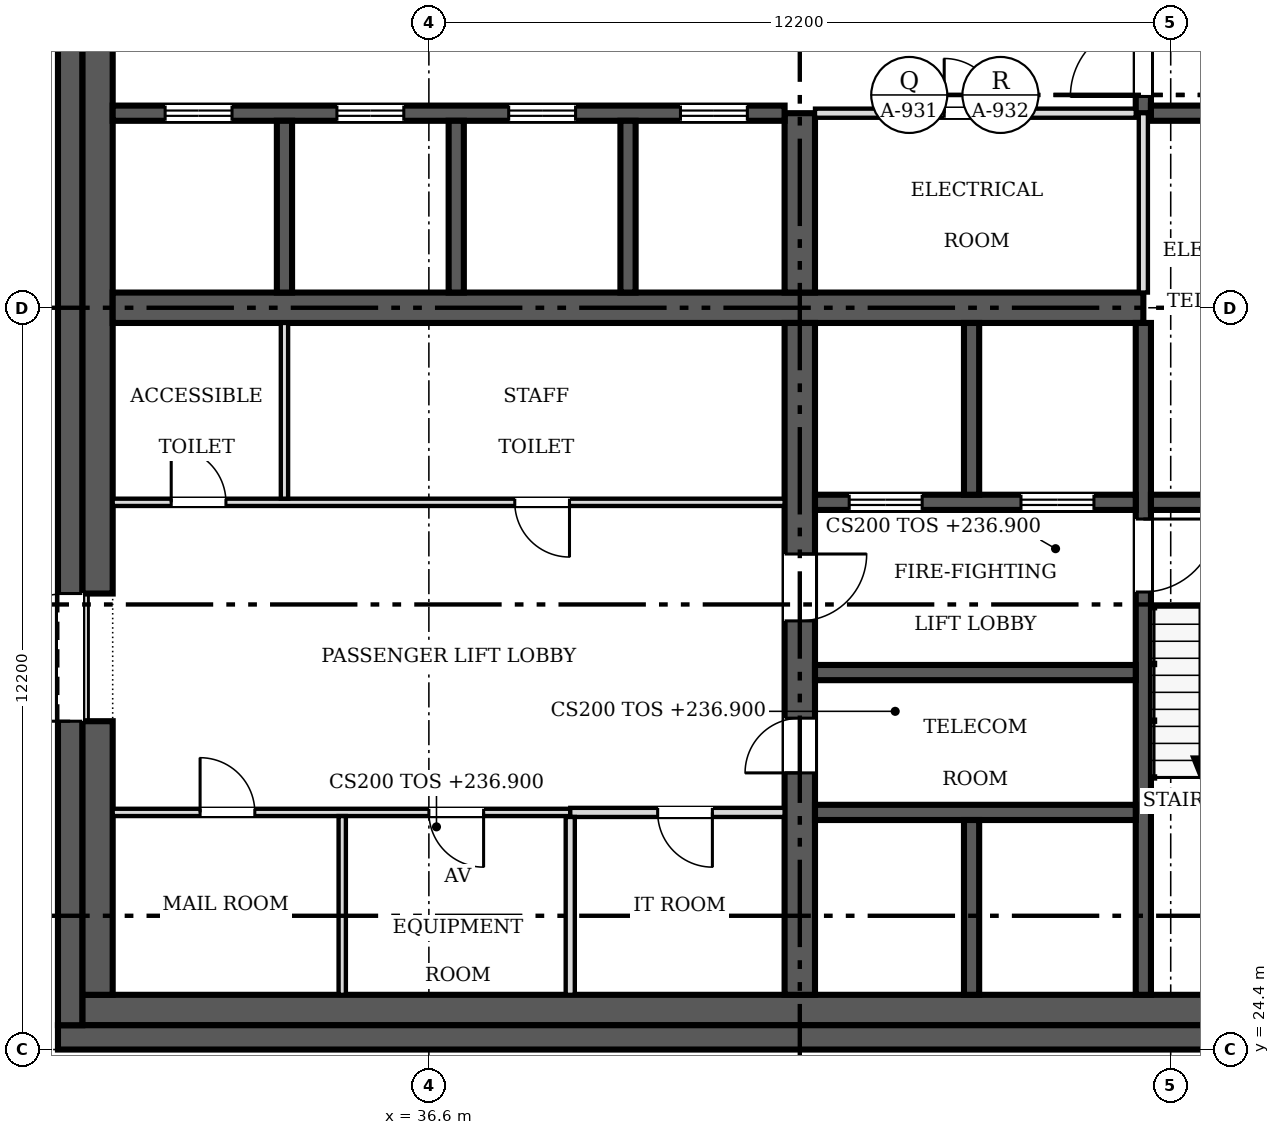
"""IFC4 building model, lengths in metres.
Left out: names, types, materials, properties, quantities, classifications, styles, units other than length and angle.
Written with IfcOpenShell. Run it as: python <this file> out.ifc"""

import sys

from ifc_helpers import new_model, si_unit, direction, frame, frame_2d, origin, place, context, subcontext, project, spatial, rectangle, extrude, source, transform, mapped, element, fill, save


model = new_model("IFC4")
c1 = context("Model", 3, precision=1e-05, world=origin(), true_north=direction((0.0, 1.0)))
c2 = subcontext(c1, "Body", "Model", "MODEL_VIEW")
j1 = project(units=[si_unit("LENGTHUNIT", "METRE"), si_unit("PLANEANGLEUNIT", "RADIAN")], contexts=[c1])
p1 = place(None, origin())
s1 = spatial("IfcSite", under=j1, at=p1, CompositionType="ELEMENT")
p2 = place(p1, origin())
s2 = spatial("IfcBuilding", under=s1, at=p2, CompositionType="ELEMENT")
p3 = place(p2, frame((0.0, 0.0, 236.9)))
s3 = spatial("IfcBuildingStorey", under=s2, at=p3, CompositionType="ELEMENT", Elevation=236.9)
p4 = place(p3, frame((54.9, 24.6, 0.0), z_axis=(0.0, 0.0, 1.0), x_axis=(-1.0, 0.0, 0.0)))
e1 = element("IfcWall", 1, at=p4, inside=s3, PredefinedType="SHEAR", context=c2, shape_type="SweptSolid", body=[
    extrude(rectangle(XDim=24.4, YDim=0.4, at=frame_2d((12.2, 0.0))), origin(), (0.0, 0.0, 1.0), 3.8),
])
m1 = source(origin(), c2, "Body", "SweptSolid", [
    extrude(rectangle(XDim=1.2, YDim=2.1, at=frame_2d((0.6, 1.05))), frame((0.0, 0.21, 0.0), z_axis=(0.0, -1.0, 0.0), x_axis=(1.0, 0.0, 0.0)), (0.0, 0.0, 1.0), 0.42),
])
p5 = place(p4, frame((1.5, 0.0, 0.0)))
e2 = element("IfcOpeningElement", 2, at=p5, cuts=e1, PredefinedType="OPENING", context=c2, shape_type="MappedRepresentation", body=[
    mapped(m1, transform((0.0, 0.0, 0.0), scale=1.0)),
])
p6 = place(p3, frame((30.7, 24.8, 0.0), z_axis=(0.0, 0.0, 1.0), x_axis=(0.0, 1.0, 0.0)))
e3 = element("IfcWall", 3, at=p6, inside=s3, PredefinedType="SHEAR", context=c2, shape_type="SweptSolid", body=[
    extrude(rectangle(XDim=23.6, YDim=0.4, at=frame_2d((11.8, 0.0))), origin(), (0.0, 0.0, 1.0), 3.8),
])
m2 = source(origin(), c2, "Body", "SweptSolid", [
    extrude(rectangle(XDim=2.1, YDim=2.4, at=frame_2d((1.05, 1.2))), frame((0.0, 0.21, 0.0), z_axis=(0.0, -1.0, 0.0), x_axis=(1.0, 0.0, 0.0)), (0.0, 0.0, 1.0), 0.42),
])
p7 = place(p6, frame((5.0, 0.0, 0.0)))
e4 = element("IfcOpeningElement", 4, at=p7, cuts=e3, PredefinedType="OPENING", context=c2, shape_type="MappedRepresentation", body=[
    mapped(m2, transform((0.0, 0.0, 0.0), scale=1.0)),
])
p8 = place(p6, frame((16.5, 0.0, 0.0)))
e5 = element("IfcOpeningElement", 5, at=p8, cuts=e3, PredefinedType="OPENING", context=c2, shape_type="MappedRepresentation", body=[
    mapped(m2, transform((0.0, 0.0, 0.0), scale=1.0)),
])
p9 = place(p3, frame((30.9, 25.05, 0.0), z_axis=(0.0, 0.0, 1.0), x_axis=(1.0, 0.0, 0.0)))
e6 = element("IfcWall", 6, at=p9, inside=s3, PredefinedType="SOLIDWALL", context=c2, shape_type="SweptSolid", body=[
    extrude(rectangle(XDim=21.3, YDim=0.5, at=frame_2d((10.65, 0.0))), origin(), (0.0, 0.0, 1.0), 3.8),
])
p10 = place(p3, frame((31.15, 25.3, 0.0), z_axis=(0.0, 0.0, 1.0), x_axis=(0.0, 1.0, 0.0)))
e7 = element("IfcWall", 7, at=p10, inside=s3, PredefinedType="SOLIDWALL", context=c2, shape_type="SweptSolid", body=[
    extrude(rectangle(XDim=4.5, YDim=0.5, at=frame_2d((2.25, 0.0))), origin(), (0.0, 0.0, 1.0), 3.8),
])
p11 = place(p3, frame((31.15, 31.9, 0.0), z_axis=(0.0, 0.0, 1.0), x_axis=(0.0, 1.0, 0.0)))
e8 = element("IfcWall", 8, at=p11, inside=s3, PredefinedType="SOLIDWALL", context=c2, shape_type="SweptSolid", body=[
    extrude(rectangle(XDim=9.4, YDim=0.5, at=frame_2d((4.7, 0.0))), origin(), (0.0, 0.0, 1.0), 3.8),
])
p12 = place(p3, frame((31.4, 36.6, 0.0), z_axis=(0.0, 0.0, 1.0), x_axis=(1.0, 0.0, 0.0)))
e9 = element("IfcWall", 9, at=p12, inside=s3, PredefinedType="SHEAR", context=c2, shape_type="SweptSolid", body=[
    extrude(rectangle(XDim=16.95, YDim=0.5, at=frame_2d((8.475, 0.0))), origin(), (0.0, 0.0, 1.0), 3.8),
])
p13 = place(p3, frame((42.7, 36.35, 0.0), z_axis=(0.0, 0.0, 1.0), x_axis=(0.0, -1.0, 0.0)))
e10 = element("IfcWall", 10, at=p13, inside=s3, PredefinedType="SHEAR", context=c2, shape_type="SweptSolid", body=[
    extrude(rectangle(XDim=11.05, YDim=0.5, at=frame_2d((5.525, 0.0))), origin(), (0.0, 0.0, 1.0), 3.8),
])
m3 = source(origin(), c2, "Body", "SweptSolid", [
    extrude(rectangle(XDim=0.9, YDim=2.1, at=frame_2d((0.45, 1.05))), frame((0.0, 0.26, 0.0), z_axis=(0.0, -1.0, 0.0), x_axis=(1.0, 0.0, 0.0)), (0.0, 0.0, 1.0), 0.52),
])
p14 = place(p13, frame((6.5, 0.0, 0.0)))
e11 = element("IfcOpeningElement", 11, at=p14, cuts=e10, PredefinedType="OPENING", context=c2, shape_type="MappedRepresentation", body=[
    mapped(m3, transform((0.0, 0.0, 0.0), scale=1.0)),
])
m4 = source(origin(), c2, "Body", "SweptSolid", [
    extrude(rectangle(XDim=1.1, YDim=2.1, at=frame_2d((0.55, 1.05))), frame((0.0, 0.26, 0.0), z_axis=(0.0, -1.0, 0.0), x_axis=(1.0, 0.0, 0.0)), (0.0, 0.0, 1.0), 0.52),
])
p15 = place(p13, frame((3.8, 0.0, 0.0)))
e12 = element("IfcOpeningElement", 12, at=p15, cuts=e10, PredefinedType="OPENING", context=c2, shape_type="MappedRepresentation", body=[
    mapped(m4, transform((0.0, 0.0, 0.0), scale=1.0)),
])
p16 = place(p3, frame((42.7, 36.85, 0.0), z_axis=(0.0, 0.0, 1.0), x_axis=(0.0, 1.0, 0.0)))
e13 = element("IfcWall", 13, at=p16, inside=s3, PredefinedType="SHEAR", context=c2, shape_type="SweptSolid", body=[
    extrude(rectangle(XDim=2.95, YDim=0.5, at=frame_2d((1.475, 0.0))), origin(), (0.0, 0.0, 1.0), 3.8),
])
p17 = place(p3, frame((31.4, 39.8, 0.0), z_axis=(0.0, 0.0, 1.0), x_axis=(1.0, 0.0, 0.0)))
e14 = element("IfcWall", 14, at=p17, inside=s3, PredefinedType="SOLIDWALL", context=c2, shape_type="SweptSolid", body=[
    extrude(rectangle(XDim=11.05, YDim=0.25, at=frame_2d((5.525, 0.0))), origin(), (0.0, 0.0, 1.0), 3.8),
])
m5 = source(origin(), c2, "Body", "SweptSolid", [
    extrude(rectangle(XDim=1.1, YDim=2.1, at=frame_2d((0.55, 1.05))), frame((0.0, 0.135, 0.0), z_axis=(0.0, -1.0, 0.0), x_axis=(1.0, 0.0, 0.0)), (0.0, 0.0, 1.0), 0.27),
])
p18 = place(p17, frame((0.863, 0.0, 0.0)))
e15 = element("IfcOpeningElement", 15, at=p18, cuts=e14, PredefinedType="OPENING", context=c2, shape_type="MappedRepresentation", body=[
    mapped(m5, transform((0.0, 0.0, 0.0), scale=1.0)),
])
p19 = place(p17, frame((3.688, 0.0, 0.0)))
e16 = element("IfcOpeningElement", 16, at=p19, cuts=e14, PredefinedType="OPENING", context=c2, shape_type="MappedRepresentation", body=[
    mapped(m5, transform((0.0, 0.0, 0.0), scale=1.0)),
])
p20 = place(p17, frame((6.512, 0.0, 0.0)))
e17 = element("IfcOpeningElement", 17, at=p20, cuts=e14, PredefinedType="OPENING", context=c2, shape_type="MappedRepresentation", body=[
    mapped(m5, transform((0.0, 0.0, 0.0), scale=1.0)),
])
p21 = place(p17, frame((9.337, 0.0, 0.0)))
e18 = element("IfcOpeningElement", 18, at=p21, cuts=e14, PredefinedType="OPENING", context=c2, shape_type="MappedRepresentation", body=[
    mapped(m5, transform((0.0, 0.0, 0.0), scale=1.0)),
])
p22 = place(p3, frame((48.35, 36.35, 0.0), z_axis=(0.0, 0.0, 1.0), x_axis=(0.0, -1.0, 0.0)))
e19 = element("IfcWall", 19, at=p22, inside=s3, PredefinedType="SOLIDWALL", context=c2, shape_type="SweptSolid", body=[
    extrude(rectangle(XDim=11.05, YDim=0.25, at=frame_2d((5.525, 0.0))), origin(), (0.0, 0.0, 1.0), 3.8),
])
m6 = source(origin(), c2, "Body", "SweptSolid", [
    extrude(rectangle(XDim=1.2, YDim=2.1, at=frame_2d((0.6, 1.05))), frame((0.0, 0.135, 0.0), z_axis=(0.0, -1.0, 0.0), x_axis=(1.0, 0.0, 0.0)), (0.0, 0.0, 1.0), 0.27),
])
p23 = place(p22, frame((3.225, 0.0, 0.0)))
e20 = element("IfcOpeningElement", 20, at=p23, cuts=e19, PredefinedType="OPENING", context=c2, shape_type="MappedRepresentation", body=[
    mapped(m6, transform((0.0, 0.0, 0.0), scale=1.0)),
])
p24 = place(p3, frame((48.225, 33.4, 0.0), z_axis=(0.0, 0.0, 1.0), x_axis=(-1.0, 0.0, 0.0)))
e21 = element("IfcWall", 21, at=p24, inside=s3, PredefinedType="SOLIDWALL", context=c2, shape_type="SweptSolid", body=[
    extrude(rectangle(XDim=5.275, YDim=0.25, at=frame_2d((2.638, 0.0))), origin(), (0.0, 0.0, 1.0), 3.8),
])
p25 = place(p24, frame((3.512, 0.0, 0.0)))
e22 = element("IfcOpeningElement", 22, at=p25, cuts=e21, PredefinedType="OPENING", context=c2, shape_type="MappedRepresentation", body=[
    mapped(m6, transform((0.0, 0.0, 0.0), scale=1.0)),
])
p26 = place(p24, frame((0.688, 0.0, 0.0)))
e23 = element("IfcOpeningElement", 23, at=p26, cuts=e21, PredefinedType="OPENING", context=c2, shape_type="MappedRepresentation", body=[
    mapped(m6, transform((0.0, 0.0, 0.0), scale=1.0)),
])
p27 = place(p3, frame((48.475, 33.4, 0.0), z_axis=(0.0, 0.0, 1.0), x_axis=(1.0, 0.0, 0.0)))
e24 = element("IfcWall", 24, at=p27, inside=s3, PredefinedType="SOLIDWALL", context=c2, shape_type="SweptSolid", body=[
    extrude(rectangle(XDim=3.525, YDim=0.25, at=frame_2d((1.762, 0.0))), origin(), (0.0, 0.0, 1.0), 3.8),
])
p28 = place(p3, frame((48.35, 47.9, 0.0), z_axis=(0.0, 0.0, 1.0), x_axis=(0.0, -1.0, 0.0)))
e25 = element("IfcWall", 25, at=p28, inside=s3, PredefinedType="SOLIDWALL", context=c2, shape_type="SweptSolid", body=[
    extrude(rectangle(XDim=8.1, YDim=0.25, at=frame_2d((4.05, 0.0))), origin(), (0.0, 0.0, 1.0), 3.8),
])
p29 = place(p28, frame((6.625, 0.0, 0.0)))
e26 = element("IfcOpeningElement", 26, at=p29, cuts=e25, PredefinedType="OPENING", context=c2, shape_type="MappedRepresentation", body=[
    mapped(m6, transform((0.0, 0.0, 0.0), scale=1.0)),
])
for number, where, z_axis, x_axis in (
    (27, (42.95, 28.3, 0.0), (0.0, 0.0, 1.0), (1.0, 0.0, 0.0)),
    (28, (42.95, 30.6, 0.0), (0.0, 0.0, 1.0), (1.0, 0.0, 0.0)),
):
    element("IfcWall", number, at=place(p3, frame(where, z_axis=z_axis, x_axis=x_axis)), inside=s3, PredefinedType="SOLIDWALL", context=c2, shape_type="SweptSolid", body=[
        extrude(rectangle(XDim=5.275, YDim=0.25, at=frame_2d((2.638, 0.0))), origin(), (0.0, 0.0, 1.0), 3.8),
    ])
p30 = place(p3, frame((48.475, 39.8, 0.0), z_axis=(0.0, 0.0, 1.0), x_axis=(1.0, 0.0, 0.0)))
e29 = element("IfcWall", 29, at=p30, inside=s3, PredefinedType="SOLIDWALL", context=c2, shape_type="SweptSolid", body=[
    extrude(rectangle(XDim=3.4, YDim=0.25, at=frame_2d((1.7, 0.0))), origin(), (0.0, 0.0, 1.0), 3.8),
])
for number, where, z_axis, x_axis in (
    (30, (34.225, 36.85, 0.0), (0.0, 0.0, 1.0), (0.0, 1.0, 0.0)),
    (31, (37.05, 36.85, 0.0), (0.0, 0.0, 1.0), (0.0, 1.0, 0.0)),
    (32, (39.875, 36.85, 0.0), (0.0, 0.0, 1.0), (0.0, 1.0, 0.0)),
):
    element("IfcWall", number, at=place(p3, frame(where, z_axis=z_axis, x_axis=x_axis)), inside=s3, PredefinedType="SOLIDWALL", context=c2, shape_type="SweptSolid", body=[
        extrude(rectangle(XDim=2.825, YDim=0.25, at=frame_2d((1.413, 0.0))), origin(), (0.0, 0.0, 1.0), 3.8),
    ])
p31 = place(p3, frame((45.525, 33.525, 0.0), z_axis=(0.0, 0.0, 1.0), x_axis=(0.0, 1.0, 0.0)))
e33 = element("IfcWall", 33, at=p31, inside=s3, PredefinedType="SOLIDWALL", context=c2, shape_type="SweptSolid", body=[
    extrude(rectangle(XDim=2.825, YDim=0.25, at=frame_2d((1.413, 0.0))), origin(), (0.0, 0.0, 1.0), 3.8),
])
p32 = place(p3, frame((45.525, 25.3, 0.0), z_axis=(0.0, 0.0, 1.0), x_axis=(0.0, 1.0, 0.0)))
e34 = element("IfcWall", 34, at=p32, inside=s3, PredefinedType="SOLIDWALL", context=c2, shape_type="SweptSolid", body=[
    extrude(rectangle(XDim=2.875, YDim=0.25, at=frame_2d((1.438, 0.0))), origin(), (0.0, 0.0, 1.0), 3.8),
])
p33 = place(p3, frame((31.4, 33.4, 0.0), z_axis=(0.0, 0.0, 1.0), x_axis=(1.0, 0.0, 0.0)))
e35 = element("IfcWall", 35, at=p33, inside=s3, PredefinedType="PARTITIONING", context=c2, shape_type="SweptSolid", body=[
    extrude(rectangle(XDim=11.05, YDim=0.12, at=frame_2d((5.525, 0.0))), origin(), (0.0, 0.0, 1.0), 3.6),
])
m7 = source(origin(), c2, "Body", "SweptSolid", [
    extrude(rectangle(XDim=0.9, YDim=2.1, at=frame_2d((0.45, 1.05))), frame((0.0, 0.07, 0.0), z_axis=(0.0, -1.0, 0.0), x_axis=(1.0, 0.0, 0.0)), (0.0, 0.0, 1.0), 0.14),
])
p34 = place(p33, frame((0.962, 0.0, 0.0)))
e36 = element("IfcOpeningElement", 36, at=p34, cuts=e35, PredefinedType="OPENING", context=c2, shape_type="MappedRepresentation", body=[
    mapped(m7, transform((0.0, 0.0, 0.0), scale=1.0)),
])
p35 = place(p33, frame((6.613, 0.0, 0.0)))
e37 = element("IfcOpeningElement", 37, at=p35, cuts=e35, PredefinedType="OPENING", context=c2, shape_type="MappedRepresentation", body=[
    mapped(m7, transform((0.0, 0.0, 0.0), scale=1.0)),
])
p36 = place(p3, frame((38.925, 28.3, 0.0), z_axis=(0.0, 0.0, 1.0), x_axis=(-1.0, 0.0, 0.0)))
e38 = element("IfcWall", 38, at=p36, inside=s3, PredefinedType="PARTITIONING", context=c2, shape_type="SweptSolid", body=[
    extrude(rectangle(XDim=7.525, YDim=0.12, at=frame_2d((3.763, 0.0))), origin(), (0.0, 0.0, 1.0), 3.6),
])
p37 = place(p36, frame((5.188, 0.0, 0.0)))
e39 = element("IfcOpeningElement", 39, at=p37, cuts=e38, PredefinedType="OPENING", context=c2, shape_type="MappedRepresentation", body=[
    mapped(m7, transform((0.0, 0.0, 0.0), scale=1.0)),
])
p38 = place(p36, frame((1.425, 0.0, 0.0)))
e40 = element("IfcOpeningElement", 40, at=p38, cuts=e38, PredefinedType="OPENING", context=c2, shape_type="MappedRepresentation", body=[
    mapped(m7, transform((0.0, 0.0, 0.0), scale=1.0)),
])
p39 = place(p3, frame((48.225, 39.8, 0.0), z_axis=(0.0, 0.0, 1.0), x_axis=(-1.0, 0.0, 0.0)))
e41 = element("IfcWall", 41, at=p39, inside=s3, PredefinedType="PARTITIONING", context=c2, shape_type="SweptSolid", body=[
    extrude(rectangle(XDim=5.275, YDim=0.15, at=frame_2d((2.638, 0.0))), origin(), (0.0, 0.0, 1.0), 3.6),
])
m8 = source(origin(), c2, "Body", "SweptSolid", [
    extrude(rectangle(XDim=0.9, YDim=2.1, at=frame_2d((0.45, 1.05))), frame((0.0, 0.085, 0.0), z_axis=(0.0, -1.0, 0.0), x_axis=(1.0, 0.0, 0.0)), (0.0, 0.0, 1.0), 0.17),
])
p40 = place(p39, frame((2.25, 0.0, 0.0)))
e42 = element("IfcOpeningElement", 42, at=p40, cuts=e41, PredefinedType="OPENING", context=c2, shape_type="MappedRepresentation", body=[
    mapped(m8, transform((0.0, 0.0, 0.0), scale=1.0)),
])
p41 = place(p3, frame((42.45, 28.3, 0.0), z_axis=(0.0, 0.0, 1.0), x_axis=(-1.0, 0.0, 0.0)))
e43 = element("IfcWall", 43, at=p41, inside=s3, PredefinedType="PARTITIONING", context=c2, shape_type="SweptSolid", body=[
    extrude(rectangle(XDim=3.525, YDim=0.15, at=frame_2d((1.762, 0.0))), origin(), (0.0, 0.0, 1.0), 3.6),
])
p42 = place(p41, frame((1.188, 0.0, 0.0)))
e44 = element("IfcOpeningElement", 44, at=p42, cuts=e43, PredefinedType="OPENING", context=c2, shape_type="MappedRepresentation", body=[
    mapped(m8, transform((0.0, 0.0, 0.0), scale=1.0)),
])
p43 = place(p3, frame((48.35, 36.85, 0.0), z_axis=(0.0, 0.0, 1.0), x_axis=(0.0, 1.0, 0.0)))
e45 = element("IfcWall", 45, at=p43, inside=s3, PredefinedType="PARTITIONING", context=c2, shape_type="SweptSolid", body=[
    extrude(rectangle(XDim=2.95, YDim=0.15, at=frame_2d((1.475, 0.0))), origin(), (0.0, 0.0, 1.0), 3.6),
])
p44 = place(p3, frame((34.225, 33.46, 0.0), z_axis=(0.0, 0.0, 1.0), x_axis=(0.0, 1.0, 0.0)))
e46 = element("IfcWall", 46, at=p44, inside=s3, PredefinedType="PARTITIONING", context=c2, shape_type="SweptSolid", body=[
    extrude(rectangle(XDim=2.89, YDim=0.12, at=frame_2d((1.445, 0.0))), origin(), (0.0, 0.0, 1.0), 3.6),
])
p45 = place(p3, frame((35.175, 25.3, 0.0), z_axis=(0.0, 0.0, 1.0), x_axis=(0.0, 1.0, 0.0)))
e47 = element("IfcWall", 47, at=p45, inside=s3, PredefinedType="PARTITIONING", context=c2, shape_type="SweptSolid", body=[
    extrude(rectangle(XDim=2.94, YDim=0.12, at=frame_2d((1.47, 0.0))), origin(), (0.0, 0.0, 1.0), 3.6),
])
p46 = place(p3, frame((38.925, 25.3, 0.0), z_axis=(0.0, 0.0, 1.0), x_axis=(0.0, 1.0, 0.0)))
e48 = element("IfcWall", 48, at=p46, inside=s3, PredefinedType="PARTITIONING", context=c2, shape_type="SweptSolid", body=[
    extrude(rectangle(XDim=2.925, YDim=0.15, at=frame_2d((1.462, 0.0))), origin(), (0.0, 0.0, 1.0), 3.6),
])
m9 = source(origin(), c2, "Body", "SweptSolid", [
    extrude(rectangle(XDim=2.1, YDim=2.4, at=frame_2d((1.05, 1.2))), frame((0.0, 0.025, 0.0), z_axis=(0.0, -1.0, 0.0), x_axis=(1.0, 0.0, 0.0)), (0.0, 0.0, 1.0), 0.05),
])
p47 = place(p7, origin())
e49 = element("IfcDoor", 49, at=p47, inside=s3, OperationType="DOUBLE_DOOR_SINGLE_SWING", PredefinedType="DOOR", context=c2, shape_type="MappedRepresentation", body=[
    mapped(m9, transform((0.0, 0.0, 0.0), scale=1.0)),
])
fill(e4, e49)
m10 = source(origin(), c2, "Body", "SweptSolid", [
    extrude(rectangle(XDim=0.9, YDim=2.1, at=frame_2d((0.45, 1.05))), frame((0.0, 0.025, 0.0), z_axis=(0.0, -1.0, 0.0), x_axis=(1.0, 0.0, 0.0)), (0.0, 0.0, 1.0), 0.05),
])
p48 = place(p14, origin())
e50 = element("IfcDoor", 50, at=p48, inside=s3, OperationType="SINGLE_SWING_RIGHT", PredefinedType="DOOR", context=c2, shape_type="MappedRepresentation", body=[
    mapped(m10, transform((0.0, 0.0, 0.0), scale=1.0)),
])
fill(e11, e50)
m11 = source(origin(), c2, "Body", "SweptSolid", [
    extrude(rectangle(XDim=1.1, YDim=2.1, at=frame_2d((0.55, 1.05))), frame((0.0, 0.025, 0.0), z_axis=(0.0, -1.0, 0.0), x_axis=(1.0, 0.0, 0.0)), (0.0, 0.0, 1.0), 0.05),
])
p49 = place(p15, origin())
e51 = element("IfcDoor", 51, at=p49, inside=s3, OperationType="SINGLE_SWING_LEFT", PredefinedType="DOOR", context=c2, shape_type="MappedRepresentation", body=[
    mapped(m11, transform((0.0, 0.0, 0.0), scale=1.0)),
])
fill(e12, e51)
p50 = place(p18, origin())
e52 = element("IfcDoor", 52, at=p50, inside=s3, OperationType="DOUBLE_DOOR_SLIDING", PredefinedType="DOOR", context=c2, shape_type="MappedRepresentation", body=[
    mapped(m11, transform((0.0, 0.0, 0.0), scale=1.0)),
])
fill(e15, e52)
p51 = place(p19, origin())
e53 = element("IfcDoor", 53, at=p51, inside=s3, OperationType="DOUBLE_DOOR_SLIDING", PredefinedType="DOOR", context=c2, shape_type="MappedRepresentation", body=[
    mapped(m11, transform((0.0, 0.0, 0.0), scale=1.0)),
])
fill(e16, e53)
p52 = place(p20, origin())
e54 = element("IfcDoor", 54, at=p52, inside=s3, OperationType="DOUBLE_DOOR_SLIDING", PredefinedType="DOOR", context=c2, shape_type="MappedRepresentation", body=[
    mapped(m11, transform((0.0, 0.0, 0.0), scale=1.0)),
])
fill(e17, e54)
p53 = place(p21, origin())
e55 = element("IfcDoor", 55, at=p53, inside=s3, OperationType="DOUBLE_DOOR_SLIDING", PredefinedType="DOOR", context=c2, shape_type="MappedRepresentation", body=[
    mapped(m11, transform((0.0, 0.0, 0.0), scale=1.0)),
])
fill(e18, e55)
m12 = source(origin(), c2, "Body", "SweptSolid", [
    extrude(rectangle(XDim=1.2, YDim=2.1, at=frame_2d((0.6, 1.05))), frame((0.0, 0.025, 0.0), z_axis=(0.0, -1.0, 0.0), x_axis=(1.0, 0.0, 0.0)), (0.0, 0.0, 1.0), 0.05),
])
p54 = place(p23, origin())
e56 = element("IfcDoor", 56, at=p54, inside=s3, OperationType="SINGLE_SWING_LEFT", PredefinedType="DOOR", context=c2, shape_type="MappedRepresentation", body=[
    mapped(m12, transform((0.0, 0.0, 0.0), scale=1.0)),
])
fill(e20, e56)
p55 = place(p25, origin())
e57 = element("IfcDoor", 57, at=p55, inside=s3, OperationType="DOUBLE_DOOR_SLIDING", PredefinedType="DOOR", context=c2, shape_type="MappedRepresentation", body=[
    mapped(m12, transform((0.0, 0.0, 0.0), scale=1.0)),
])
fill(e22, e57)
p56 = place(p26, origin())
e58 = element("IfcDoor", 58, at=p56, inside=s3, OperationType="DOUBLE_DOOR_SLIDING", PredefinedType="DOOR", context=c2, shape_type="MappedRepresentation", body=[
    mapped(m12, transform((0.0, 0.0, 0.0), scale=1.0)),
])
fill(e23, e58)
p57 = place(p29, origin())
e59 = element("IfcDoor", 59, at=p57, inside=s3, OperationType="SINGLE_SWING_RIGHT", PredefinedType="DOOR", context=c2, shape_type="MappedRepresentation", body=[
    mapped(m12, transform((0.0, 0.0, 0.0), scale=1.0)),
])
fill(e26, e59)
p58 = place(p34, origin())
e60 = element("IfcDoor", 60, at=p58, inside=s3, OperationType="SINGLE_SWING_LEFT", PredefinedType="DOOR", context=c2, shape_type="MappedRepresentation", body=[
    mapped(m10, transform((0.0, 0.0, 0.0), scale=1.0)),
])
fill(e36, e60)
p59 = place(p35, origin())
e61 = element("IfcDoor", 61, at=p59, inside=s3, OperationType="SINGLE_SWING_RIGHT", PredefinedType="DOOR", context=c2, shape_type="MappedRepresentation", body=[
    mapped(m10, transform((0.0, 0.0, 0.0), scale=1.0)),
])
fill(e37, e61)
p60 = place(p37, origin())
e62 = element("IfcDoor", 62, at=p60, inside=s3, OperationType="SINGLE_SWING_RIGHT", PredefinedType="DOOR", context=c2, shape_type="MappedRepresentation", body=[
    mapped(m10, transform((0.0, 0.0, 0.0), scale=1.0)),
])
fill(e39, e62)
p61 = place(p38, origin())
e63 = element("IfcDoor", 63, at=p61, inside=s3, OperationType="SINGLE_SWING_LEFT", PredefinedType="DOOR", context=c2, shape_type="MappedRepresentation", body=[
    mapped(m10, transform((0.0, 0.0, 0.0), scale=1.0)),
])
fill(e40, e63)
p62 = place(p40, origin())
e64 = element("IfcDoor", 64, at=p62, inside=s3, OperationType="SINGLE_SWING_RIGHT", PredefinedType="DOOR", context=c2, shape_type="MappedRepresentation", body=[
    mapped(m10, transform((0.0, 0.0, 0.0), scale=1.0)),
])
fill(e42, e64)
p63 = place(p42, origin())
e65 = element("IfcDoor", 65, at=p63, inside=s3, OperationType="SINGLE_SWING_LEFT", PredefinedType="DOOR", context=c2, shape_type="MappedRepresentation", body=[
    mapped(m10, transform((0.0, 0.0, 0.0), scale=1.0)),
])
fill(e44, e65)
save(model, sys.argv[1])
